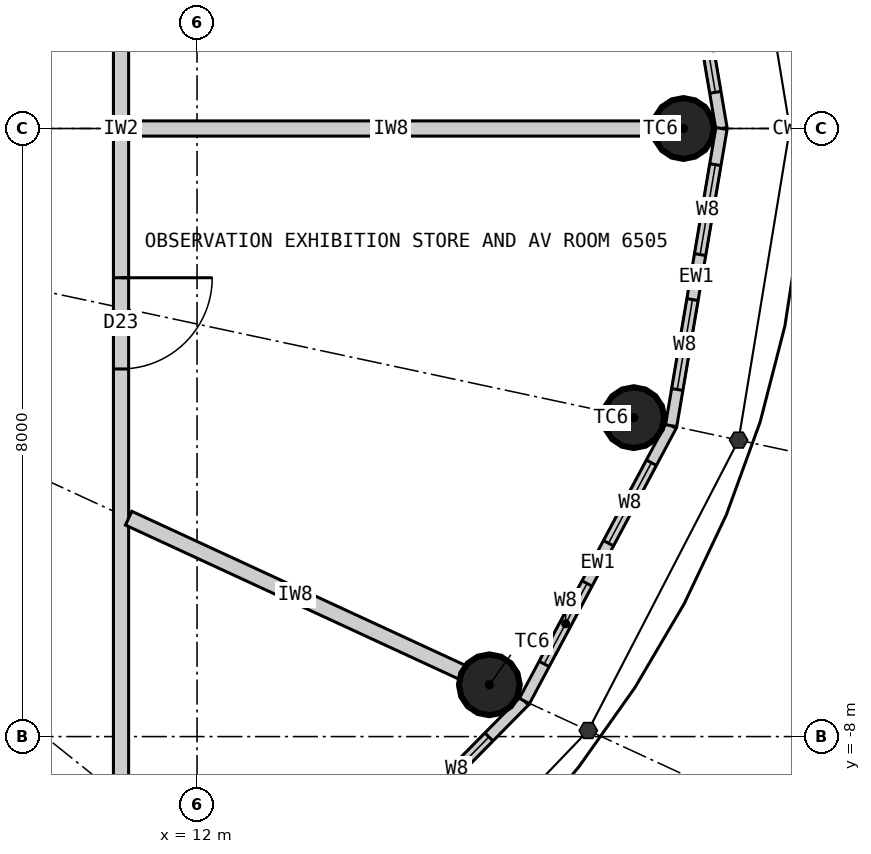
"""IFC4 building model, lengths in metres.
Left out: names, types, materials, properties, quantities, classifications, styles, units other than length and angle.
Written with IfcOpenShell. Run it as: python <this file> out.ifc"""

import sys

from ifc_helpers import new_model, si_unit, direction, frame, frame_2d, origin, origin_2d, place, context, subcontext, project, spatial, rectangle, circle, extrude, element, fill, save


model = new_model("IFC4")
c1 = context("Model", 3, precision=1e-05, world=origin(), true_north=direction((0.0, 1.0)))
c2 = subcontext(c1, "Body", "Model", "MODEL_VIEW")
j1 = project(units=[si_unit("LENGTHUNIT", "METRE"), si_unit("PLANEANGLEUNIT", "RADIAN")], contexts=[c1])
p1 = place(None, origin())
s1 = spatial("IfcSite", under=j1, at=p1, CompositionType="ELEMENT")
p2 = place(p1, origin())
s2 = spatial("IfcBuilding", under=s1, at=p2, CompositionType="ELEMENT")
p3 = place(p2, frame((0.0, 0.0, 242.7)))
s3 = spatial("IfcBuildingStorey", under=s2, at=p3, CompositionType="ELEMENT", Elevation=242.7)
for number, where, z_axis, x_axis in (
    (1, (18.4, 0.0, 0.0), (0.0, 0.0, 1.0), (1.0, 0.0, 0.0)),
    (2, (15.846, -7.319, 0.0), (0.0, 0.0, 1.0), (1.0, 0.0, 0.0)),
    (3, (17.746, -3.804, 0.0), (0.0, 0.0, 1.0), (1.0, 0.0, 0.0)),
):
    element("IfcColumn", number, at=place(p3, frame(where, z_axis=z_axis, x_axis=x_axis)), inside=s3, PredefinedType="COLUMN", context=c2, shape_type="SweptSolid", body=[
        extrude(circle(Radius=0.4, at=origin_2d()), origin(), (0.0, 0.0, 1.0), 6.0),
    ])
p4 = place(p3, frame((18.9, 0.0, 0.0), z_axis=(0.0, 0.0, 1.0), x_axis=(-0.166984464914, 0.985959526795, 0.0)))
e4 = element("IfcWall", 4, at=p4, inside=s3, PredefinedType="ELEMENTEDWALL", context=c2, shape_type="SweptSolid", body=[
    extrude(rectangle(XDim=3.965, YDim=0.15, at=frame_2d((1.982, 0.0))), origin(), (0.0, 0.0, 1.0), 5.7),
])
p5 = place(p4, frame((0.483, 0.0, 0.5)))
e5 = element("IfcOpeningElement", 5, at=p5, cuts=e4, PredefinedType="OPENING", context=c2, shape_type="SweptSolid", body=[
    extrude(rectangle(XDim=1.2, YDim=4.2, at=frame_2d((0.6, 2.1))), frame((0.0, 0.085, 0.0), z_axis=(0.0, -1.0, 0.0), x_axis=(1.0, 0.0, 0.0)), (0.0, 0.0, 1.0), 0.17),
])
p6 = place(p4, frame((2.282, 0.0, 0.5)))
e6 = element("IfcOpeningElement", 6, at=p6, cuts=e4, PredefinedType="OPENING", context=c2, shape_type="SweptSolid", body=[
    extrude(rectangle(XDim=1.2, YDim=4.2, at=frame_2d((0.6, 2.1))), frame((0.0, 0.085, 0.0), z_axis=(0.0, -1.0, 0.0), x_axis=(1.0, 0.0, 0.0)), (0.0, 0.0, 1.0), 0.17),
])
p7 = place(p3, frame((13.266, -10.613, 0.0), z_axis=(0.0, 0.0, 1.0), x_axis=(0.702523956258, 0.711660095048, 0.0)))
e7 = element("IfcWall", 7, at=p7, inside=s3, PredefinedType="ELEMENTEDWALL", context=c2, shape_type="SweptSolid", body=[
    extrude(rectangle(XDim=4.329, YDim=0.15, at=frame_2d((2.165, 0.0))), origin(), (0.0, 0.0, 1.0), 5.7),
])
p8 = place(p7, frame((0.665, 0.0, 0.5)))
e8 = element("IfcOpeningElement", 8, at=p8, cuts=e7, PredefinedType="OPENING", context=c2, shape_type="SweptSolid", body=[
    extrude(rectangle(XDim=1.2, YDim=4.2, at=frame_2d((0.6, 2.1))), frame((0.0, 0.085, 0.0), z_axis=(0.0, -1.0, 0.0), x_axis=(1.0, 0.0, 0.0)), (0.0, 0.0, 1.0), 0.17),
])
p9 = place(p7, frame((2.465, 0.0, 0.5)))
e9 = element("IfcOpeningElement", 9, at=p9, cuts=e7, PredefinedType="OPENING", context=c2, shape_type="SweptSolid", body=[
    extrude(rectangle(XDim=1.2, YDim=4.2, at=frame_2d((0.6, 2.1))), frame((0.0, 0.085, 0.0), z_axis=(0.0, -1.0, 0.0), x_axis=(1.0, 0.0, 0.0)), (0.0, 0.0, 1.0), 0.17),
])
p10 = place(p3, frame((16.307, -7.532, 0.0), z_axis=(0.0, 0.0, 1.0), x_axis=(0.470282591286, 0.882515883332, 0.0)))
e10 = element("IfcWall", 10, at=p10, inside=s3, PredefinedType="ELEMENTEDWALL", context=c2, shape_type="SweptSolid", body=[
    extrude(rectangle(XDim=4.105, YDim=0.15, at=frame_2d((2.052, 0.0))), origin(), (0.0, 0.0, 1.0), 5.7),
])
p11 = place(p10, frame((0.552, 0.0, 0.5)))
e11 = element("IfcOpeningElement", 11, at=p11, cuts=e10, PredefinedType="OPENING", context=c2, shape_type="SweptSolid", body=[
    extrude(rectangle(XDim=1.2, YDim=4.2, at=frame_2d((0.6, 2.1))), frame((0.0, 0.085, 0.0), z_axis=(0.0, -1.0, 0.0), x_axis=(1.0, 0.0, 0.0)), (0.0, 0.0, 1.0), 0.17),
])
p12 = place(p10, frame((2.353, 0.0, 0.5)))
e12 = element("IfcOpeningElement", 12, at=p12, cuts=e10, PredefinedType="OPENING", context=c2, shape_type="SweptSolid", body=[
    extrude(rectangle(XDim=1.2, YDim=4.2, at=frame_2d((0.6, 2.1))), frame((0.0, 0.085, 0.0), z_axis=(0.0, -1.0, 0.0), x_axis=(1.0, 0.0, 0.0)), (0.0, 0.0, 1.0), 0.17),
])
p13 = place(p3, frame((18.238, -3.909, 0.0), z_axis=(0.0, 0.0, 1.0), x_axis=(0.166984464914, 0.985959526795, 0.0)))
e13 = element("IfcWall", 13, at=p13, inside=s3, PredefinedType="ELEMENTEDWALL", context=c2, shape_type="SweptSolid", body=[
    extrude(rectangle(XDim=3.965, YDim=0.15, at=frame_2d((1.982, 0.0))), origin(), (0.0, 0.0, 1.0), 5.7),
])
p14 = place(p13, frame((0.483, 0.0, 0.5)))
e14 = element("IfcOpeningElement", 14, at=p14, cuts=e13, PredefinedType="OPENING", context=c2, shape_type="SweptSolid", body=[
    extrude(rectangle(XDim=1.2, YDim=4.2, at=frame_2d((0.6, 2.1))), frame((0.0, 0.085, 0.0), z_axis=(0.0, -1.0, 0.0), x_axis=(1.0, 0.0, 0.0)), (0.0, 0.0, 1.0), 0.17),
])
p15 = place(p13, frame((2.282, 0.0, 0.5)))
e15 = element("IfcOpeningElement", 15, at=p15, cuts=e13, PredefinedType="OPENING", context=c2, shape_type="SweptSolid", body=[
    extrude(rectangle(XDim=1.2, YDim=4.2, at=frame_2d((0.6, 2.1))), frame((0.0, 0.085, 0.0), z_axis=(0.0, -1.0, 0.0), x_axis=(1.0, 0.0, 0.0)), (0.0, 0.0, 1.0), 0.17),
])
p16 = place(p3, frame((11.0, -9.9, 0.0), z_axis=(0.0, 0.0, 1.0), x_axis=(0.0, 1.0, 0.0)))
e16 = element("IfcWall", 16, at=p16, inside=s3, PredefinedType="PARTITIONING", context=c2, shape_type="SweptSolid", body=[
    extrude(rectangle(XDim=19.8, YDim=0.2, at=frame_2d((9.9, 0.0))), origin(), (0.0, 0.0, 1.0), 5.7),
])
p17 = place(p16, frame((6.737, 0.0, 0.0)))
e17 = element("IfcOpeningElement", 17, at=p17, cuts=e16, PredefinedType="OPENING", context=c2, shape_type="SweptSolid", body=[
    extrude(rectangle(XDim=1.2, YDim=2.2, at=frame_2d((0.6, 1.1))), frame((0.0, 0.11, 0.0), z_axis=(0.0, -1.0, 0.0), x_axis=(1.0, 0.0, 0.0)), (0.0, 0.0, 1.0), 0.22),
])
p18 = place(p3, frame((11.1, 0.0, 0.0), z_axis=(0.0, 0.0, 1.0), x_axis=(1.0, 0.0, 0.0)))
e18 = element("IfcWall", 18, at=p18, inside=s3, PredefinedType="PARTITIONING", context=c2, shape_type="SweptSolid", body=[
    extrude(rectangle(XDim=6.9, YDim=0.2, at=frame_2d((3.45, 0.0))), origin(), (0.0, 0.0, 1.0), 4.85),
])
p19 = place(p3, frame((11.1, -5.127, 0.0), z_axis=(0.0, 0.0, 1.0), x_axis=(0.90783501602, -0.41932753748, 0.0)))
e19 = element("IfcWall", 19, at=p19, inside=s3, PredefinedType="PARTITIONING", context=c2, shape_type="SweptSolid", body=[
    extrude(rectangle(XDim=4.828, YDim=0.2, at=frame_2d((2.414, 0.0))), origin(), (0.0, 0.0, 1.0), 4.8),
])
p20 = place(p5, origin())
e20 = element("IfcWindow", 20, at=p20, inside=s3, PartitioningType="SINGLE_PANEL", PredefinedType="WINDOW", context=c2, shape_type="SweptSolid", body=[
    extrude(rectangle(XDim=1.2, YDim=4.2, at=frame_2d((0.6, 2.1))), frame((0.0, 0.03, 0.0), z_axis=(0.0, -1.0, 0.0), x_axis=(1.0, 0.0, 0.0)), (0.0, 0.0, 1.0), 0.06),
])
fill(e5, e20)
p21 = place(p9, origin())
e21 = element("IfcWindow", 21, at=p21, inside=s3, PartitioningType="SINGLE_PANEL", PredefinedType="WINDOW", context=c2, shape_type="SweptSolid", body=[
    extrude(rectangle(XDim=1.2, YDim=4.2, at=frame_2d((0.6, 2.1))), frame((0.0, 0.03, 0.0), z_axis=(0.0, -1.0, 0.0), x_axis=(1.0, 0.0, 0.0)), (0.0, 0.0, 1.0), 0.06),
])
fill(e9, e21)
p22 = place(p11, origin())
e22 = element("IfcWindow", 22, at=p22, inside=s3, PartitioningType="SINGLE_PANEL", PredefinedType="WINDOW", context=c2, shape_type="SweptSolid", body=[
    extrude(rectangle(XDim=1.2, YDim=4.2, at=frame_2d((0.6, 2.1))), frame((0.0, 0.03, 0.0), z_axis=(0.0, -1.0, 0.0), x_axis=(1.0, 0.0, 0.0)), (0.0, 0.0, 1.0), 0.06),
])
fill(e11, e22)
p23 = place(p12, origin())
e23 = element("IfcWindow", 23, at=p23, inside=s3, PartitioningType="SINGLE_PANEL", PredefinedType="WINDOW", context=c2, shape_type="SweptSolid", body=[
    extrude(rectangle(XDim=1.2, YDim=4.2, at=frame_2d((0.6, 2.1))), frame((0.0, 0.03, 0.0), z_axis=(0.0, -1.0, 0.0), x_axis=(1.0, 0.0, 0.0)), (0.0, 0.0, 1.0), 0.06),
])
fill(e12, e23)
p24 = place(p14, origin())
e24 = element("IfcWindow", 24, at=p24, inside=s3, PartitioningType="SINGLE_PANEL", PredefinedType="WINDOW", context=c2, shape_type="SweptSolid", body=[
    extrude(rectangle(XDim=1.2, YDim=4.2, at=frame_2d((0.6, 2.1))), frame((0.0, 0.03, 0.0), z_axis=(0.0, -1.0, 0.0), x_axis=(1.0, 0.0, 0.0)), (0.0, 0.0, 1.0), 0.06),
])
fill(e14, e24)
p25 = place(p15, origin())
e25 = element("IfcWindow", 25, at=p25, inside=s3, PartitioningType="SINGLE_PANEL", PredefinedType="WINDOW", context=c2, shape_type="SweptSolid", body=[
    extrude(rectangle(XDim=1.2, YDim=4.2, at=frame_2d((0.6, 2.1))), frame((0.0, 0.03, 0.0), z_axis=(0.0, -1.0, 0.0), x_axis=(1.0, 0.0, 0.0)), (0.0, 0.0, 1.0), 0.06),
])
fill(e15, e25)
p26 = place(p17, origin())
e26 = element("IfcDoor", 26, at=p26, inside=s3, OperationType="SINGLE_SWING_RIGHT", PredefinedType="DOOR", context=c2, shape_type="SweptSolid", body=[
    extrude(rectangle(XDim=1.2, YDim=2.2, at=frame_2d((0.6, 1.1))), frame((0.0, 0.025, 0.0), z_axis=(0.0, -1.0, 0.0), x_axis=(1.0, 0.0, 0.0)), (0.0, 0.0, 1.0), 0.05),
])
fill(e17, e26)
save(model, sys.argv[1])
